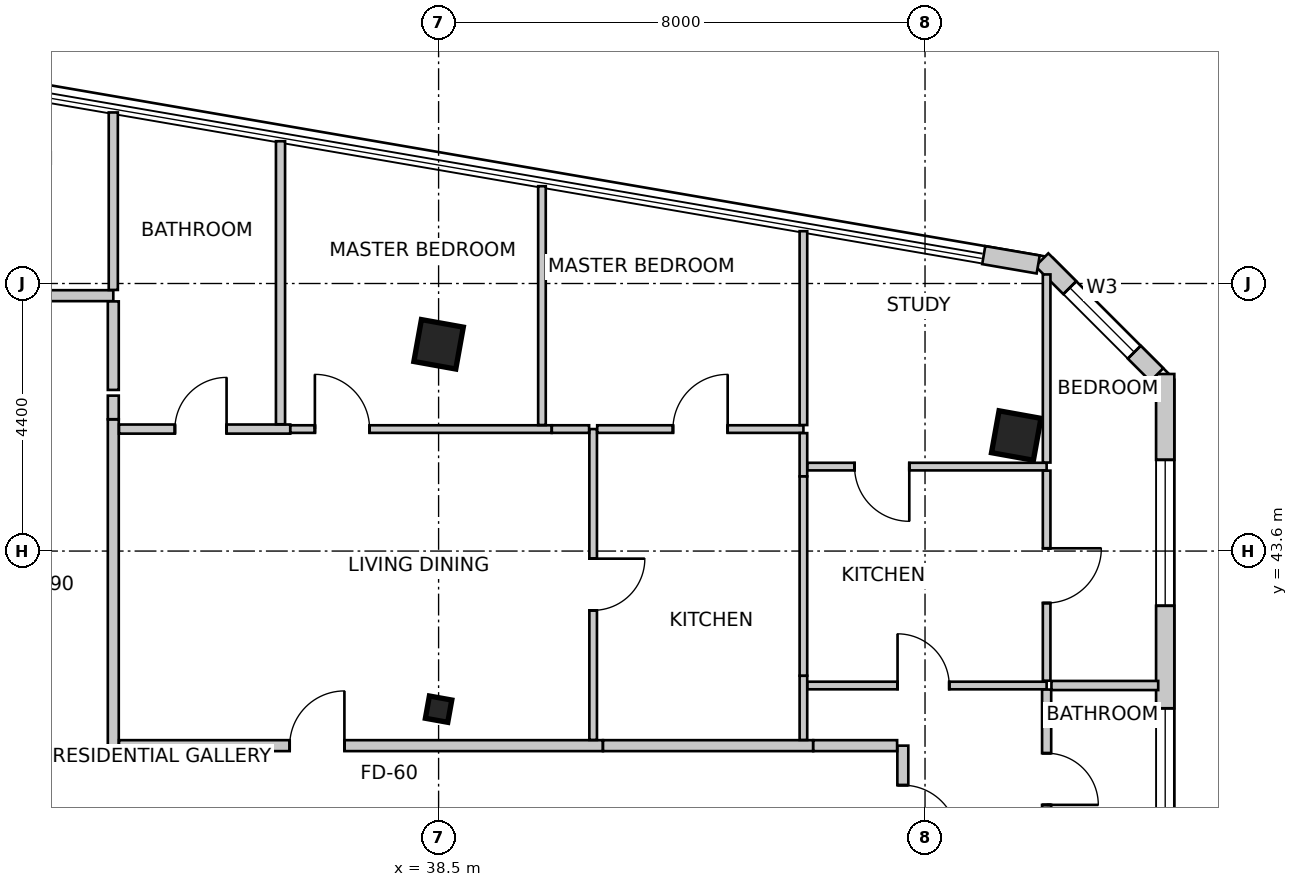
"""IFC4 building model, lengths in metres.
Left out: names, types, materials, properties, quantities, classifications, styles, units other than length and angle.
Written with IfcOpenShell. Run it as: python <this file> out.ifc"""

import sys

from ifc_helpers import new_model, si_unit, direction, frame, frame_2d, origin, origin_2d, place, context, subcontext, project, spatial, rectangle, i_section, extrude, source, transform, mapped, element, fill, save


model = new_model("IFC4")
c1 = context("Model", 3, precision=1e-05, world=origin(), true_north=direction((0.0, 1.0)))
c2 = subcontext(c1, "Body", "Model", "MODEL_VIEW")
j1 = project(units=[si_unit("LENGTHUNIT", "METRE"), si_unit("PLANEANGLEUNIT", "RADIAN")], contexts=[c1])
p1 = place(None, origin())
s1 = spatial("IfcSite", under=j1, at=p1, CompositionType="ELEMENT")
p2 = place(p1, origin())
s2 = spatial("IfcBuilding", under=s1, at=p2, CompositionType="ELEMENT")
p3 = place(p2, frame((0.0, 0.0, 193.9)))
s3 = spatial("IfcBuildingStorey", under=s2, at=p3, CompositionType="ELEMENT", Elevation=193.9)
m1 = source(origin(), c2, "Body", "SweptSolid", [
    extrude(rectangle(XDim=0.7, YDim=0.7, at=origin_2d()), origin(), (0.0, 0.0, 1.0), 3.5),
])
for number, where, z_axis, x_axis in (
    (1, (38.5, 47.0, 0.0), (0.0, 0.0, 1.0), (0.984, -0.177, 0.0)),
    (2, (48.0, 45.5, 0.0), (0.0, 0.0, 1.0), (0.984, -0.177, 0.0)),
):
    element("IfcColumn", number, at=place(p3, frame(where, z_axis=z_axis, x_axis=x_axis)), inside=s3, PredefinedType="COLUMN", context=c2, shape_type="MappedRepresentation", body=[
        mapped(m1, transform((0.0, 0.0, 0.0), scale=1.0)),
    ])
m2 = source(origin(), c2, "Body", "SweptSolid", [
    extrude(i_section(OverallWidth=0.374, OverallDepth=0.372, WebThickness=0.016, FlangeThickness=0.026, FilletRadius=0.015, at=origin_2d()), origin(), (0.0, 0.0, 1.0), 3.5),
])
p4 = place(p3, frame((38.5, 41.0, 0.0), z_axis=(0.0, 0.0, 1.0), x_axis=(0.984195607969, -0.17708474032, 0.0)))
e3 = element("IfcColumn", 3, at=p4, inside=s3, PredefinedType="COLUMN", context=c2, shape_type="MappedRepresentation", body=[
    mapped(m2, transform((0.0, 0.0, 0.0), scale=1.0)),
])
p5 = place(p3, frame((50.45, 35.781, 0.0), z_axis=(0.0, 0.0, 1.0), x_axis=(0.0, 1.0, 0.0)))
e4 = element("IfcWall", 4, at=p5, inside=s3, PredefinedType="SOLIDWALL", context=c2, shape_type="SweptSolid", body=[
    extrude(rectangle(XDim=10.731, YDim=0.3, at=frame_2d((5.365, 0.0))), origin(), (0.0, 0.0, 1.0), 3.25),
])
m3 = source(origin(), c2, "Body", "SweptSolid", [
    extrude(rectangle(XDim=2.1, YDim=2.0, at=frame_2d((1.05, 1.0))), frame((0.0, 0.16, 0.0), z_axis=(0.0, -1.0, 0.0), x_axis=(1.0, 0.0, 0.0)), (0.0, 0.0, 1.0), 0.32),
])
p6 = place(p5, frame((0.379, 0.0, 0.85)))
e5 = element("IfcOpeningElement", 5, at=p6, cuts=e4, PredefinedType="OPENING", context=c2, shape_type="MappedRepresentation", body=[
    mapped(m3, transform((0.0, 0.0, 0.0), scale=1.0)),
])
p7 = place(p5, frame((3.133, 0.0, 0.85)))
e6 = element("IfcOpeningElement", 6, at=p7, cuts=e4, PredefinedType="OPENING", context=c2, shape_type="MappedRepresentation", body=[
    mapped(m3, transform((0.0, 0.0, 0.0), scale=1.0)),
])
m4 = source(origin(), c2, "Body", "SweptSolid", [
    extrude(rectangle(XDim=2.4, YDim=2.2, at=frame_2d((1.2, 1.1))), frame((0.0, 0.16, 0.0), z_axis=(0.0, -1.0, 0.0), x_axis=(1.0, 0.0, 0.0)), (0.0, 0.0, 1.0), 0.32),
])
p8 = place(p5, frame((6.919, 0.0, 0.85)))
e7 = element("IfcOpeningElement", 7, at=p8, cuts=e4, PredefinedType="OPENING", context=c2, shape_type="MappedRepresentation", body=[
    mapped(m4, transform((0.0, 0.0, 0.0), scale=1.0)),
])
p9 = place(p3, frame((50.312, 46.5, 0.0), z_axis=(0.0, 0.0, 1.0), x_axis=(-0.707106781187, 0.707106781187, 0.0)))
e8 = element("IfcWall", 8, at=p9, inside=s3, PredefinedType="SOLIDWALL", context=c2, shape_type="SweptSolid", body=[
    extrude(rectangle(XDim=2.673, YDim=0.3, at=frame_2d((1.337, 0.0))), origin(), (0.0, 0.0, 1.0), 3.25),
])
m5 = source(origin(), c2, "Body", "SweptSolid", [
    extrude(rectangle(XDim=1.5, YDim=1.8, at=frame_2d((0.75, 0.9))), frame((0.0, 0.16, 0.0), z_axis=(0.0, -1.0, 0.0), x_axis=(1.0, 0.0, 0.0)), (0.0, 0.0, 1.0), 0.32),
])
p10 = place(p9, frame((0.524, 0.0, 0.85)))
e9 = element("IfcOpeningElement", 9, at=p10, cuts=e8, PredefinedType="OPENING", context=c2, shape_type="MappedRepresentation", body=[
    mapped(m5, transform((0.0, 0.0, 0.0), scale=1.0)),
])
p11 = place(p3, frame((48.361, 48.313, 0.0), z_axis=(0.0, 0.0, 1.0), x_axis=(-0.985560806516, 0.169321872949, 0.0)))
e10 = element("IfcWall", 10, at=p11, inside=s3, PredefinedType="SOLIDWALL", context=c2, shape_type="SweptSolid", body=[
    extrude(rectangle(XDim=0.908, YDim=0.3, at=frame_2d((0.454, 0.0))), origin(), (0.0, 0.0, 1.0), 3.25),
])
p12 = place(p3, frame((28.362, 47.8, 0.0), z_axis=(0.0, 0.0, 1.0), x_axis=(1.0, 0.0, 0.0)))
e11 = element("IfcWall", 11, at=p12, inside=s3, PredefinedType="PARTITIONING", context=c2, shape_type="SweptSolid", body=[
    extrude(rectangle(XDim=4.788, YDim=0.18, at=frame_2d((2.394, 0.0))), origin(), (0.0, 0.0, 1.0), 2.688),
])
m6 = source(origin(), c2, "Body", "SweptSolid", [
    extrude(rectangle(XDim=0.85, YDim=2.15, at=frame_2d((0.425, 1.075))), frame((0.0, 0.1, 0.0), z_axis=(0.0, -1.0, 0.0), x_axis=(1.0, 0.0, 0.0)), (0.0, 0.0, 1.0), 0.2),
])
p13 = place(p12, frame((0.401, 0.0, 0.0)))
e12 = element("IfcOpeningElement", 12, at=p13, cuts=e11, PredefinedType="OPENING", context=c2, shape_type="MappedRepresentation", body=[
    mapped(m6, transform((0.0, 0.0, 0.0), scale=1.0)),
])
p14 = place(p3, frame((33.15, 47.706, 0.0), z_axis=(0.0, 0.0, 1.0), x_axis=(0.0, -1.0, 0.0)))
e13 = element("IfcWall", 13, at=p14, inside=s3, PredefinedType="PARTITIONING", context=c2, shape_type="SweptSolid", body=[
    extrude(rectangle(XDim=1.456, YDim=0.18, at=frame_2d((0.728, 0.0))), origin(), (0.0, 0.0, 1.0), 2.688),
])
p15 = place(p3, frame((33.15, 45.766, 0.0), z_axis=(0.0, 0.0, 1.0), x_axis=(0.0, -1.0, 0.0)))
e14 = element("IfcWall", 14, at=p15, inside=s3, PredefinedType="PARTITIONING", context=c2, shape_type="SweptSolid", body=[
    extrude(rectangle(XDim=5.526, YDim=0.18, at=frame_2d((2.763, 0.0))), origin(), (0.0, 0.0, 1.0), 2.688),
])
p16 = place(p3, frame((33.15, 46.156, 0.0), z_axis=(0.0, 0.0, 1.0), x_axis=(0.0, -1.0, 0.0)))
e15 = element("IfcWall", 15, at=p16, inside=s3, PredefinedType="PARTITIONING", context=c2, shape_type="SweptSolid", body=[
    extrude(rectangle(XDim=0.388, YDim=0.18, at=frame_2d((0.194, 0.0))), origin(), (0.0, 0.0, 1.0), 3.25),
])
p17 = place(p3, frame((33.15, 50.813, 0.0), z_axis=(0.0, 0.0, 1.0), x_axis=(0.0, -1.0, 0.0)))
e16 = element("IfcWall", 16, at=p17, inside=s3, PredefinedType="PARTITIONING", context=c2, shape_type="SweptSolid", body=[
    extrude(rectangle(XDim=2.919, YDim=0.15, at=frame_2d((1.459, 0.0))), origin(), (0.0, 0.0, 1.0), 2.542),
])
p18 = place(p3, frame((33.244, 40.4, 0.0), z_axis=(0.0, 0.0, 1.0), x_axis=(1.0, 0.0, 0.0)))
e17 = element("IfcWall", 17, at=p18, inside=s3, PredefinedType="PARTITIONING", context=c2, shape_type="SweptSolid", body=[
    extrude(rectangle(XDim=7.958, YDim=0.18, at=frame_2d((3.979, 0.0))), origin(), (0.0, 0.0, 1.0), 2.688),
])
m7 = source(origin(), c2, "Body", "SweptSolid", [
    extrude(rectangle(XDim=0.9, YDim=2.15, at=frame_2d((0.45, 1.075))), frame((0.0, 0.1, 0.0), z_axis=(0.0, -1.0, 0.0), x_axis=(1.0, 0.0, 0.0)), (0.0, 0.0, 1.0), 0.2),
])
p19 = place(p18, frame((2.807, 0.0, 0.0)))
e18 = element("IfcOpeningElement", 18, at=p19, cuts=e17, PredefinedType="OPENING", context=c2, shape_type="MappedRepresentation", body=[
    mapped(m7, transform((0.0, 0.0, 0.0), scale=1.0)),
])
p20 = place(p3, frame((41.204, 40.4, 0.0), z_axis=(0.0, 0.0, 1.0), x_axis=(1.0, 0.0, 0.0)))
e19 = element("IfcWall", 19, at=p20, inside=s3, PredefinedType="PARTITIONING", context=c2, shape_type="SweptSolid", body=[
    extrude(rectangle(XDim=3.456, YDim=0.18, at=frame_2d((1.728, 0.0))), origin(), (0.0, 0.0, 1.0), 2.688),
])
p21 = place(p3, frame((46.135, 40.4, 0.0), z_axis=(0.0, 0.0, 1.0), x_axis=(0.0, -1.0, 0.0)))
e20 = element("IfcWall", 20, at=p21, inside=s3, PredefinedType="PARTITIONING", context=c2, shape_type="SweptSolid", body=[
    extrude(rectangle(XDim=2.2, YDim=0.18, at=frame_2d((1.1, 0.0))), origin(), (0.0, 0.0, 1.0), 3.25),
])
p22 = place(p21, frame((0.65, 0.0, 0.0)))
e21 = element("IfcOpeningElement", 21, at=p22, cuts=e20, PredefinedType="OPENING", context=c2, shape_type="MappedRepresentation", body=[
    mapped(m7, transform((0.0, 0.0, 0.0), scale=1.0)),
])
p23 = place(p3, frame((44.662, 40.4, 0.0), z_axis=(0.0, 0.0, 1.0), x_axis=(1.0, 0.0, 0.0)))
e22 = element("IfcWall", 22, at=p23, inside=s3, PredefinedType="PARTITIONING", context=c2, shape_type="SweptSolid", body=[
    extrude(rectangle(XDim=1.379, YDim=0.18, at=frame_2d((0.689, 0.0))), origin(), (0.0, 0.0, 1.0), 3.25),
])
p24 = place(p3, frame((41.042, 45.606, 0.0), z_axis=(0.0, 0.0, 1.0), x_axis=(0.0, -1.0, 0.0)))
e23 = element("IfcWall", 23, at=p24, inside=s3, PredefinedType="PARTITIONING", context=c2, shape_type="SweptSolid", body=[
    extrude(rectangle(XDim=5.112, YDim=0.125, at=frame_2d((2.556, 0.0))), origin(), (0.0, 0.0, 1.0), 2.688),
])
m8 = source(origin(), c2, "Body", "SweptSolid", [
    extrude(rectangle(XDim=0.85, YDim=2.15, at=frame_2d((0.425, 1.075))), frame((0.0, 0.073, 0.0), z_axis=(0.0, -1.0, 0.0), x_axis=(1.0, 0.0, 0.0)), (0.0, 0.0, 1.0), 0.145),
])
p25 = place(p24, frame((2.131, 0.0, 0.0)))
e24 = element("IfcOpeningElement", 24, at=p25, cuts=e23, PredefinedType="OPENING", context=c2, shape_type="MappedRepresentation", body=[
    mapped(m8, transform((0.0, 0.0, 0.0), scale=1.0)),
])
p26 = place(p3, frame((33.244, 45.606, 0.0), z_axis=(0.0, 0.0, 1.0), x_axis=(1.0, 0.0, 0.0)))
e25 = element("IfcWall", 25, at=p26, inside=s3, PredefinedType="PARTITIONING", context=c2, shape_type="SweptSolid", body=[
    extrude(rectangle(XDim=2.816, YDim=0.15, at=frame_2d((1.408, 0.0))), origin(), (0.0, 0.0, 1.0), 2.688),
])
m9 = source(origin(), c2, "Body", "SweptSolid", [
    extrude(rectangle(XDim=0.85, YDim=2.15, at=frame_2d((0.425, 1.075))), frame((0.0, 0.085, 0.0), z_axis=(0.0, -1.0, 0.0), x_axis=(1.0, 0.0, 0.0)), (0.0, 0.0, 1.0), 0.17),
])
p27 = place(p26, frame((0.919, 0.0, 0.0)))
e26 = element("IfcOpeningElement", 26, at=p27, cuts=e25, PredefinedType="OPENING", context=c2, shape_type="MappedRepresentation", body=[
    mapped(m9, transform((0.0, 0.0, 0.0), scale=1.0)),
])
p28 = place(p3, frame((36.062, 45.606, 0.0), z_axis=(0.0, 0.0, 1.0), x_axis=(1.0, 0.0, 0.0)))
e27 = element("IfcWall", 27, at=p28, inside=s3, PredefinedType="PARTITIONING", context=c2, shape_type="SweptSolid", body=[
    extrude(rectangle(XDim=4.298, YDim=0.125, at=frame_2d((2.149, 0.0))), origin(), (0.0, 0.0, 1.0), 2.766),
])
m10 = source(origin(), c2, "Body", "SweptSolid", [
    extrude(rectangle(XDim=0.9, YDim=2.15, at=frame_2d((0.45, 1.075))), frame((0.0, 0.073, 0.0), z_axis=(0.0, -1.0, 0.0), x_axis=(1.0, 0.0, 0.0)), (0.0, 0.0, 1.0), 0.145),
])
p29 = place(p28, frame((0.403, 0.0, 0.0)))
e28 = element("IfcOpeningElement", 28, at=p29, cuts=e27, PredefinedType="OPENING", context=c2, shape_type="MappedRepresentation", body=[
    mapped(m10, transform((0.0, 0.0, 0.0), scale=1.0)),
])
p30 = place(p3, frame((40.362, 45.606, 0.0), z_axis=(0.0, 0.0, 1.0), x_axis=(1.0, 0.0, 0.0)))
e29 = element("IfcWall", 29, at=p30, inside=s3, PredefinedType="PARTITIONING", context=c2, shape_type="SweptSolid", body=[
    extrude(rectangle(XDim=0.614, YDim=0.125, at=frame_2d((0.307, 0.0))), origin(), (0.0, 0.0, 1.0), 3.25),
])
p31 = place(p3, frame((41.108, 45.606, 0.0), z_axis=(0.0, 0.0, 1.0), x_axis=(1.0, 0.0, 0.0)))
e30 = element("IfcWall", 30, at=p31, inside=s3, PredefinedType="PARTITIONING", context=c2, shape_type="SweptSolid", body=[
    extrude(rectangle(XDim=3.392, YDim=0.125, at=frame_2d((1.696, 0.0))), origin(), (0.0, 0.0, 1.0), 3.25),
])
p32 = place(p31, frame((1.246, 0.0, 0.0)))
e31 = element("IfcOpeningElement", 31, at=p32, cuts=e30, PredefinedType="OPENING", context=c2, shape_type="MappedRepresentation", body=[
    mapped(m10, transform((0.0, 0.0, 0.0), scale=1.0)),
])
p33 = place(p3, frame((44.5, 45.54, 0.0), z_axis=(0.0, 0.0, 1.0), x_axis=(0.0, -1.0, 0.0)))
e32 = element("IfcWall", 32, at=p33, inside=s3, PredefinedType="PARTITIONING", context=c2, shape_type="SweptSolid", body=[
    extrude(rectangle(XDim=0.71, YDim=0.125, at=frame_2d((0.355, 0.0))), origin(), (0.0, 0.0, 1.0), 3.25),
])
p34 = place(p3, frame((44.5, 41.549, 0.0), z_axis=(0.0, 0.0, 1.0), x_axis=(0.0, -1.0, 0.0)))
e33 = element("IfcWall", 33, at=p34, inside=s3, PredefinedType="PARTITIONING", context=c2, shape_type="SweptSolid", body=[
    extrude(rectangle(XDim=1.055, YDim=0.125, at=frame_2d((0.528, 0.0))), origin(), (0.0, 0.0, 1.0), 2.688),
])
p35 = place(p3, frame((44.5, 44.827, 0.0), z_axis=(0.0, 0.0, 1.0), x_axis=(0.0, -1.0, 0.0)))
e34 = element("IfcWall", 34, at=p35, inside=s3, PredefinedType="PARTITIONING", context=c2, shape_type="SweptSolid", body=[
    extrude(rectangle(XDim=3.276, YDim=0.125, at=frame_2d((1.638, 0.0))), origin(), (0.0, 0.0, 1.0), 2.688),
])
p36 = place(p3, frame((35.9, 50.34, 0.0), z_axis=(0.0, 0.0, 1.0), x_axis=(0.0, -1.0, 0.0)))
e35 = element("IfcWall", 35, at=p36, inside=s3, PredefinedType="PARTITIONING", context=c2, shape_type="SweptSolid", body=[
    extrude(rectangle(XDim=4.655, YDim=0.15, at=frame_2d((2.327, 0.0))), origin(), (0.0, 0.0, 1.0), 2.542),
])
p37 = place(p3, frame((40.2, 49.6, 0.0), z_axis=(0.0, 0.0, 1.0), x_axis=(0.0, -1.0, 0.0)))
e36 = element("IfcWall", 36, at=p37, inside=s3, PredefinedType="PARTITIONING", context=c2, shape_type="SweptSolid", body=[
    extrude(rectangle(XDim=3.927, YDim=0.125, at=frame_2d((1.964, 0.0))), origin(), (0.0, 0.0, 1.0), 2.542),
])
p38 = place(p3, frame((44.5, 48.86, 0.0), z_axis=(0.0, 0.0, 1.0), x_axis=(0.0, -1.0, 0.0)))
e37 = element("IfcWall", 37, at=p38, inside=s3, PredefinedType="PARTITIONING", context=c2, shape_type="SweptSolid", body=[
    extrude(rectangle(XDim=3.188, YDim=0.125, at=frame_2d((1.594, 0.0))), origin(), (0.0, 0.0, 1.0), 2.542),
])
p39 = place(p3, frame((48.5, 44.989, 0.0), z_axis=(0.0, 0.0, 1.0), x_axis=(-1.0, 0.0, 0.0)))
e38 = element("IfcWall", 38, at=p39, inside=s3, PredefinedType="PARTITIONING", context=c2, shape_type="SweptSolid", body=[
    extrude(rectangle(XDim=3.934, YDim=0.125, at=frame_2d((1.967, 0.0))), origin(), (0.0, 0.0, 1.0), 2.688),
])
p40 = place(p39, frame((2.259, 0.0, 0.0)))
e39 = element("IfcOpeningElement", 39, at=p40, cuts=e38, PredefinedType="OPENING", context=c2, shape_type="MappedRepresentation", body=[
    mapped(m10, transform((0.0, 0.0, 0.0), scale=1.0)),
])
p41 = place(p3, frame((48.5, 48.149, 0.0), z_axis=(0.0, 0.0, 1.0), x_axis=(0.0, -1.0, 0.0)))
e40 = element("IfcWall", 40, at=p41, inside=s3, PredefinedType="PARTITIONING", context=c2, shape_type="SweptSolid", body=[
    extrude(rectangle(XDim=3.094, YDim=0.125, at=frame_2d((1.547, 0.0))), origin(), (0.0, 0.0, 1.0), 3.25),
])
p42 = place(p3, frame((44.566, 41.389, 0.0), z_axis=(0.0, 0.0, 1.0), x_axis=(1.0, 0.0, 0.0)))
e41 = element("IfcWall", 41, at=p42, inside=s3, PredefinedType="PARTITIONING", context=c2, shape_type="SweptSolid", body=[
    extrude(rectangle(XDim=3.934, YDim=0.125, at=frame_2d((1.967, 0.0))), origin(), (0.0, 0.0, 1.0), 2.766),
])
p43 = place(p42, frame((1.482, 0.0, 0.0)))
e42 = element("IfcOpeningElement", 42, at=p43, cuts=e41, PredefinedType="OPENING", context=c2, shape_type="MappedRepresentation", body=[
    mapped(m8, transform((0.0, 0.0, 0.0), scale=1.0)),
])
p44 = place(p3, frame((48.5, 41.323, 0.0), z_axis=(0.0, 0.0, 1.0), x_axis=(0.0, -1.0, 0.0)))
e43 = element("IfcWall", 43, at=p44, inside=s3, PredefinedType="PARTITIONING", context=c2, shape_type="SweptSolid", body=[
    extrude(rectangle(XDim=2.944, YDim=0.15, at=frame_2d((1.472, 0.0))), origin(), (0.0, 0.0, 1.0), 3.25),
])
p45 = place(p44, frame((1.047, 0.0, 0.0)))
e44 = element("IfcOpeningElement", 44, at=p45, cuts=e43, PredefinedType="OPENING", context=c2, shape_type="MappedRepresentation", body=[
    mapped(m9, transform((0.0, 0.0, 0.0), scale=1.0)),
])
p46 = place(p3, frame((48.5, 44.923, 0.0), z_axis=(0.0, 0.0, 1.0), x_axis=(0.0, -1.0, 0.0)))
e45 = element("IfcWall", 45, at=p46, inside=s3, PredefinedType="PARTITIONING", context=c2, shape_type="SweptSolid", body=[
    extrude(rectangle(XDim=3.455, YDim=0.125, at=frame_2d((1.727, 0.0))), origin(), (0.0, 0.0, 1.0), 3.25),
])
p47 = place(p46, frame((1.277, 0.0, 0.0)))
e46 = element("IfcOpeningElement", 46, at=p47, cuts=e45, PredefinedType="OPENING", context=c2, shape_type="MappedRepresentation", body=[
    mapped(m10, transform((0.0, 0.0, 0.0), scale=1.0)),
])
p48 = place(p3, frame((48.579, 41.389, 0.0), z_axis=(0.0, 0.0, 1.0), x_axis=(1.0, 0.0, 0.0)))
e47 = element("IfcWall", 47, at=p48, inside=s3, PredefinedType="PARTITIONING", context=c2, shape_type="SweptSolid", body=[
    extrude(rectangle(XDim=1.756, YDim=0.15, at=frame_2d((0.878, 0.0))), origin(), (0.0, 0.0, 1.0), 3.25),
])
m11 = source(origin(), c2, "Body", "SweptSolid", [
    extrude(rectangle(XDim=2.1, YDim=2.0, at=frame_2d((1.05, 1.0))), frame((0.0, -0.015, 0.0), z_axis=(0.0, -1.0, 0.0), x_axis=(1.0, 0.0, 0.0)), (0.0, 0.0, 1.0), 0.06),
])
p49 = place(p7, origin())
e48 = element("IfcWindow", 48, at=p49, inside=s3, PartitioningType="SINGLE_PANEL", PredefinedType="WINDOW", context=c2, shape_type="MappedRepresentation", body=[
    mapped(m11, transform((0.0, 0.0, 0.0), scale=1.0)),
])
fill(e6, e48)
m12 = source(origin(), c2, "Body", "SweptSolid", [
    extrude(rectangle(XDim=2.4, YDim=2.2, at=frame_2d((1.2, 1.1))), frame((0.0, -0.015, 0.0), z_axis=(0.0, -1.0, 0.0), x_axis=(1.0, 0.0, 0.0)), (0.0, 0.0, 1.0), 0.06),
])
p50 = place(p8, origin())
e49 = element("IfcWindow", 49, at=p50, inside=s3, PartitioningType="SINGLE_PANEL", PredefinedType="WINDOW", context=c2, shape_type="MappedRepresentation", body=[
    mapped(m12, transform((0.0, 0.0, 0.0), scale=1.0)),
])
fill(e7, e49)
m13 = source(origin(), c2, "Body", "SweptSolid", [
    extrude(rectangle(XDim=1.5, YDim=1.8, at=frame_2d((0.75, 0.9))), frame((0.0, -0.015, 0.0), z_axis=(0.0, -1.0, 0.0), x_axis=(1.0, 0.0, 0.0)), (0.0, 0.0, 1.0), 0.06),
])
p51 = place(p10, origin())
e50 = element("IfcWindow", 50, at=p51, inside=s3, PartitioningType="SINGLE_PANEL", PredefinedType="WINDOW", context=c2, shape_type="MappedRepresentation", body=[
    mapped(m13, transform((0.0, 0.0, 0.0), scale=1.0)),
])
fill(e9, e50)
m14 = source(origin(), c2, "Body", "SweptSolid", [
    extrude(rectangle(XDim=0.9, YDim=2.15, at=frame_2d((0.45, 1.075))), frame((0.0, 0.025, 0.0), z_axis=(0.0, -1.0, 0.0), x_axis=(1.0, 0.0, 0.0)), (0.0, 0.0, 1.0), 0.05),
])
p52 = place(p19, origin())
e51 = element("IfcDoor", 51, at=p52, inside=s3, OperationType="SINGLE_SWING_RIGHT", PredefinedType="DOOR", context=c2, shape_type="MappedRepresentation", body=[
    mapped(m14, transform((0.0, 0.0, 0.0), scale=1.0)),
])
fill(e18, e51)
m15 = source(origin(), c2, "Body", "SweptSolid", [
    extrude(rectangle(XDim=0.85, YDim=2.15, at=frame_2d((0.425, 1.075))), frame((0.0, 0.025, 0.0), z_axis=(0.0, -1.0, 0.0), x_axis=(1.0, 0.0, 0.0)), (0.0, 0.0, 1.0), 0.05),
])
p53 = place(p25, origin())
e52 = element("IfcDoor", 52, at=p53, inside=s3, OperationType="SINGLE_SWING_LEFT", PredefinedType="DOOR", context=c2, shape_type="MappedRepresentation", body=[
    mapped(m15, transform((0.0, 0.0, 0.0), scale=1.0)),
])
fill(e24, e52)
p54 = place(p27, origin())
e53 = element("IfcDoor", 53, at=p54, inside=s3, OperationType="SINGLE_SWING_RIGHT", PredefinedType="DOOR", context=c2, shape_type="MappedRepresentation", body=[
    mapped(m15, transform((0.0, 0.0, 0.0), scale=1.0)),
])
fill(e26, e53)
m16 = source(origin(), c2, "Body", "SweptSolid", [
    extrude(rectangle(XDim=0.9, YDim=2.15, at=frame_2d((0.45, 1.075))), frame((0.0, 0.025, 0.0), z_axis=(0.0, -1.0, 0.0), x_axis=(1.0, 0.0, 0.0)), (0.0, 0.0, 1.0), 0.05),
])
p55 = place(p29, origin())
e54 = element("IfcDoor", 54, at=p55, inside=s3, OperationType="SINGLE_SWING_LEFT", PredefinedType="DOOR", context=c2, shape_type="MappedRepresentation", body=[
    mapped(m16, transform((0.0, 0.0, 0.0), scale=1.0)),
])
fill(e28, e54)
p56 = place(p32, origin())
e55 = element("IfcDoor", 55, at=p56, inside=s3, OperationType="SINGLE_SWING_RIGHT", PredefinedType="DOOR", context=c2, shape_type="MappedRepresentation", body=[
    mapped(m16, transform((0.0, 0.0, 0.0), scale=1.0)),
])
fill(e31, e55)
p57 = place(p40, origin())
e56 = element("IfcDoor", 56, at=p57, inside=s3, OperationType="SINGLE_SWING_LEFT", PredefinedType="DOOR", context=c2, shape_type="MappedRepresentation", body=[
    mapped(m16, transform((0.0, 0.0, 0.0), scale=1.0)),
])
fill(e39, e56)
p58 = place(p22, origin())
e57 = element("IfcDoor", 57, at=p58, inside=s3, OperationType="SINGLE_SWING_RIGHT", PredefinedType="DOOR", context=c2, shape_type="MappedRepresentation", body=[
    mapped(m14, transform((0.0, 0.0, 0.0), scale=1.0)),
])
fill(e21, e57)
p59 = place(p43, origin())
e58 = element("IfcDoor", 58, at=p59, inside=s3, OperationType="SINGLE_SWING_LEFT", PredefinedType="DOOR", context=c2, shape_type="MappedRepresentation", body=[
    mapped(m15, transform((0.0, 0.0, 0.0), scale=1.0)),
])
fill(e42, e58)
p60 = place(p45, origin())
e59 = element("IfcDoor", 59, at=p60, inside=s3, OperationType="SINGLE_SWING_RIGHT", PredefinedType="DOOR", context=c2, shape_type="MappedRepresentation", body=[
    mapped(m15, transform((0.0, 0.0, 0.0), scale=1.0)),
])
fill(e44, e59)
p61 = place(p47, origin())
e60 = element("IfcDoor", 60, at=p61, inside=s3, OperationType="SINGLE_SWING_LEFT", PredefinedType="DOOR", context=c2, shape_type="MappedRepresentation", body=[
    mapped(m16, transform((0.0, 0.0, 0.0), scale=1.0)),
])
fill(e46, e60)
save(model, sys.argv[1])
